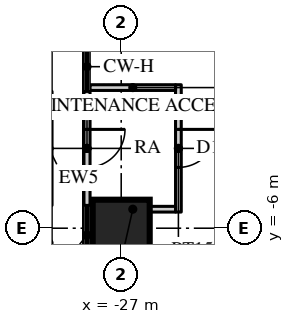
"""IFC4 building model, lengths in metres.
Left out: names, types, materials, properties, quantities, classifications, styles, units other than length and angle.
Written with IfcOpenShell. Run it as: python <this file> out.ifc"""

import sys

from ifc_helpers import new_model, si_unit, direction, frame, frame_2d, origin, origin_2d, place, context, subcontext, project, spatial, rectangle, extrude, element, fill, save


model = new_model("IFC4")
c1 = context("Model", 3, precision=1e-05, world=origin(), true_north=direction((0.0, 1.0)))
c2 = subcontext(c1, "Body", "Model", "MODEL_VIEW")
j1 = project(units=[si_unit("LENGTHUNIT", "METRE"), si_unit("PLANEANGLEUNIT", "RADIAN")], contexts=[c1])
p1 = place(None, origin())
s1 = spatial("IfcSite", under=j1, at=p1, CompositionType="ELEMENT")
p2 = place(p1, origin())
s2 = spatial("IfcBuilding", under=s1, at=p2, CompositionType="ELEMENT")
p3 = place(p2, frame((0.0, 0.0, 204.9)))
s3 = spatial("IfcBuildingStorey", under=s2, at=p3, CompositionType="ELEMENT", Elevation=204.9)
p4 = place(p3, frame((-27.0, -6.0, -0.13), z_axis=(0.0, 0.0, 1.0), x_axis=(1.0, 0.0, 0.0)))
e1 = element("IfcColumn", 1, at=p4, inside=s3, PredefinedType="COLUMN", context=c2, shape_type="SweptSolid", body=[
    extrude(rectangle(XDim=1.5, YDim=1.5, at=origin_2d()), origin(), (0.0, 0.0, 1.0), 4.03),
])
p5 = place(p3, frame((-27.9, -2.4, 0.0), z_axis=(0.0, 0.0, 1.0), x_axis=(0.0, -1.0, 0.0)))
e2 = element("IfcWall", 2, at=p5, inside=s3, PredefinedType="SOLIDWALL", context=c2, shape_type="SweptSolid", body=[
    extrude(rectangle(XDim=3.0, YDim=0.16, at=frame_2d((1.5, 0.0))), origin(), (0.0, 0.0, 1.0), 3.77),
])
p6 = place(p5, frame((1.0, 0.0, 0.0)))
e3 = element("IfcOpeningElement", 3, at=p6, cuts=e2, PredefinedType="OPENING", context=c2, shape_type="SweptSolid", body=[
    extrude(rectangle(XDim=1.0, YDim=2.2, at=frame_2d((0.5, 1.1))), frame((0.0, 0.09, 0.0), z_axis=(0.0, -1.0, 0.0), x_axis=(1.0, 0.0, 0.0)), (0.0, 0.0, 1.0), 0.18),
])
p7 = place(p3, frame((-28.9, -5.4, 0.0), z_axis=(0.0, 0.0, 1.0), x_axis=(0.0, 1.0, 0.0)))
e4 = element("IfcWall", 4, at=p7, inside=s3, PredefinedType="SOLIDWALL", context=c2, shape_type="SweptSolid", body=[
    extrude(rectangle(XDim=3.0, YDim=0.16, at=frame_2d((1.5, 0.0))), origin(), (0.0, 0.0, 1.0), 3.9),
])
p8 = place(p7, frame((1.0, 0.0, 0.0)))
e5 = element("IfcOpeningElement", 5, at=p8, cuts=e4, PredefinedType="OPENING", context=c2, shape_type="SweptSolid", body=[
    extrude(rectangle(XDim=1.0, YDim=2.2, at=frame_2d((0.5, 1.1))), frame((0.0, 0.09, 0.0), z_axis=(0.0, -1.0, 0.0), x_axis=(1.0, 0.0, 0.0)), (0.0, 0.0, 1.0), 0.18),
])
p9 = place(p3, frame((-25.495, -2.225, 0.0), z_axis=(0.0, 0.0, 1.0), x_axis=(0.0, -1.0, 0.0)))
e6 = element("IfcWall", 6, at=p9, inside=s3, PredefinedType="PARTITIONING", context=c2, shape_type="SweptSolid", body=[
    extrude(rectangle(XDim=3.35, YDim=0.15, at=frame_2d((1.675, 0.0))), origin(), (0.0, 0.0, 1.0), 3.77),
])
p10 = place(p9, frame((1.175, 0.0, 0.0)))
e7 = element("IfcOpeningElement", 7, at=p10, cuts=e6, PredefinedType="OPENING", context=c2, shape_type="SweptSolid", body=[
    extrude(rectangle(XDim=1.0, YDim=2.2, at=frame_2d((0.5, 1.1))), frame((0.0, 0.085, 0.0), z_axis=(0.0, -1.0, 0.0), x_axis=(1.0, 0.0, 0.0)), (0.0, 0.0, 1.0), 0.17),
])
for number, where, z_axis, x_axis in (
    (8, (-25.57, -2.3, 0.0), (0.0, 0.0, 1.0), (-1.0, 0.0, 0.0)),
    (9, (-25.57, -5.5, 0.0), (0.0, 0.0, 1.0), (-1.0, 0.0, 0.0)),
):
    element("IfcWall", number, at=place(p3, frame(where, z_axis=z_axis, x_axis=x_axis)), inside=s3, PredefinedType="PARTITIONING", context=c2, shape_type="SweptSolid", body=[
        extrude(rectangle(XDim=2.25, YDim=0.15, at=frame_2d((1.125, 0.0))), origin(), (0.0, 0.0, 1.0), 3.77),
    ])
p11 = place(p6, origin())
e10 = element("IfcDoor", 10, at=p11, inside=s3, OperationType="SINGLE_SWING_LEFT", PredefinedType="DOOR", context=c2, shape_type="SweptSolid", body=[
    extrude(rectangle(XDim=1.0, YDim=2.2, at=frame_2d((0.5, 1.1))), frame((0.0, 0.025, 0.0), z_axis=(0.0, -1.0, 0.0), x_axis=(1.0, 0.0, 0.0)), (0.0, 0.0, 1.0), 0.05),
])
fill(e3, e10)
p12 = place(p10, origin())
e11 = element("IfcDoor", 11, at=p12, inside=s3, OperationType="SINGLE_SWING_LEFT", PredefinedType="DOOR", context=c2, shape_type="SweptSolid", body=[
    extrude(rectangle(XDim=1.0, YDim=2.2, at=frame_2d((0.5, 1.1))), frame((0.0, 0.025, 0.0), z_axis=(0.0, -1.0, 0.0), x_axis=(1.0, 0.0, 0.0)), (0.0, 0.0, 1.0), 0.05),
])
fill(e7, e11)
save(model, sys.argv[1])
